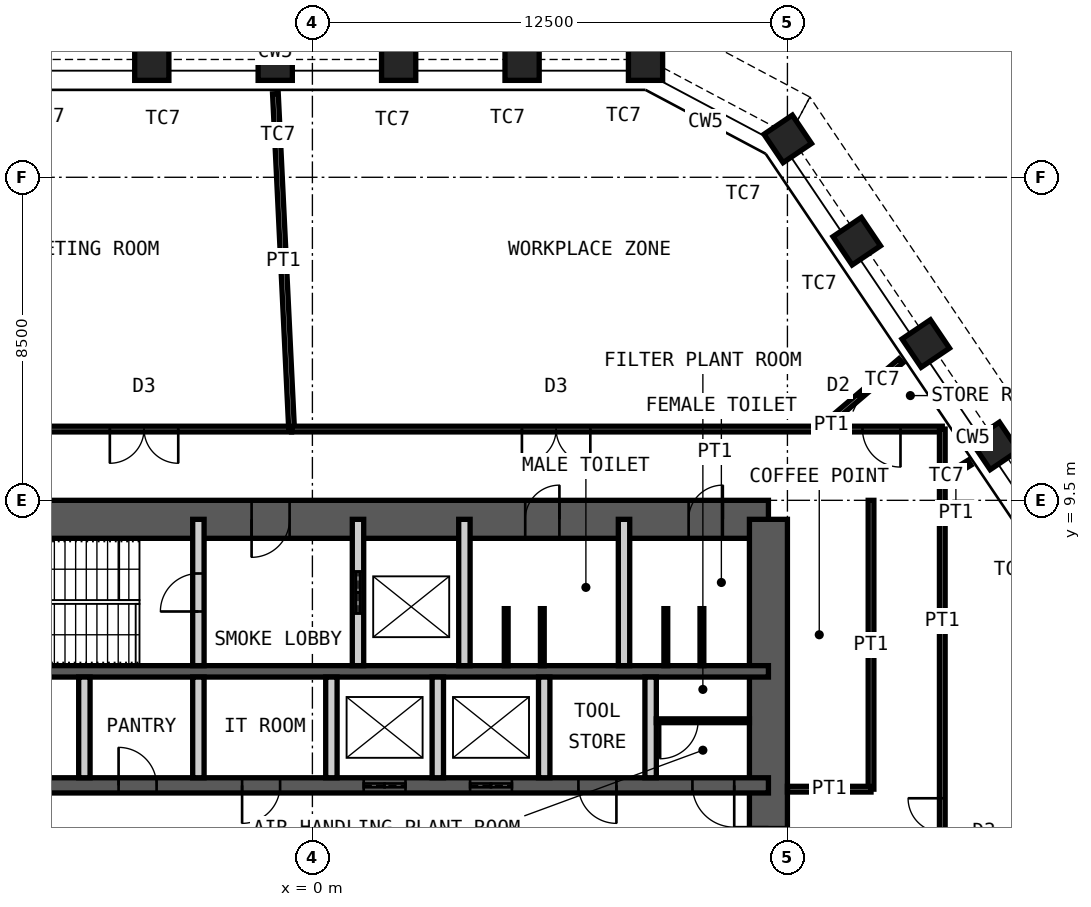
"""IFC4 building model, lengths in metres.
Left out: names, types, materials, properties, quantities, classifications, styles, units other than length and angle.
Written with IfcOpenShell. Run it as: python <this file> out.ifc"""

import sys

from ifc_helpers import new_model, si_unit, direction, frame, frame_2d, origin, origin_2d, place, context, subcontext, project, spatial, rectangle, hollow_rectangle, extrude, element, fill, save


model = new_model("IFC4")
c1 = context("Model", 3, precision=1e-05, world=origin(), true_north=direction((0.0, 1.0)))
c2 = subcontext(c1, "Body", "Model", "MODEL_VIEW")
j1 = project(units=[si_unit("LENGTHUNIT", "METRE"), si_unit("PLANEANGLEUNIT", "RADIAN")], contexts=[c1])
p1 = place(None, origin())
s1 = spatial("IfcSite", under=j1, at=p1, CompositionType="ELEMENT")
p2 = place(p1, origin())
s2 = spatial("IfcBuilding", under=s1, at=p2, CompositionType="ELEMENT")
p3 = place(p2, frame((0.0, 0.0, 299.8)))
s3 = spatial("IfcBuildingStorey", under=s2, at=p3, CompositionType="ELEMENT", Elevation=299.8)
for number, where, z_axis, x_axis in (
    (1, (-4.226, 21.0, 0.0), (0.0, 0.0, 1.0), (-1.0, 0.0, 0.0)),
    (2, (-0.978, 21.0, 0.0), (0.0, 0.0, 1.0), (-1.0, 0.0, 0.0)),
    (3, (2.27, 21.0, 0.0), (0.0, 0.0, 1.0), (-1.0, 0.0, 0.0)),
    (4, (5.518, 21.0, 0.0), (0.0, 0.0, 1.0), (-1.0, 0.0, 0.0)),
    (5, (8.766, 21.0, 0.0), (0.0, 0.0, 1.0), (-1.0, 0.0, 0.0)),
    (6, (12.508, 19.01, 0.0), (0.0, 0.0, 1.0), (-0.559, 0.829, 0.0)),
    (7, (14.324, 16.318, 0.0), (0.0, 0.0, 1.0), (-0.559, 0.829, 0.0)),
    (8, (16.141, 13.625, 0.0), (0.0, 0.0, 1.0), (-0.559, 0.829, 0.0)),
    (9, (17.957, 10.932, 0.0), (0.0, 0.0, 1.0), (-0.559, 0.829, 0.0)),
):
    element("IfcColumn", number, at=place(p3, frame(where, z_axis=z_axis, x_axis=x_axis)), inside=s3, PredefinedType="COLUMN", context=c2, shape_type="SweptSolid", body=[
        extrude(hollow_rectangle(XDim=0.9, YDim=0.9, WallThickness=0.06, at=origin_2d()), origin(), (0.0, 0.0, 1.0), 4.2),
    ])
p4 = place(p3, frame((-12.0, 9.0, 0.0), z_axis=(0.0, 0.0, 1.0), x_axis=(1.0, 0.0, 0.0)))
e10 = element("IfcWall", 10, at=p4, inside=s3, PredefinedType="SHEAR", context=c2, shape_type="SweptSolid", body=[
    extrude(rectangle(XDim=24.0, YDim=1.0, at=frame_2d((12.0, 0.0))), origin(), (0.0, 0.0, 1.0), 4.2),
])
p5 = place(p4, frame((10.4, 0.0, 0.0)))
e11 = element("IfcOpeningElement", 11, at=p5, cuts=e10, PredefinedType="OPENING", context=c2, shape_type="SweptSolid", body=[
    extrude(rectangle(XDim=1.0, YDim=2.1, at=frame_2d((0.5, 1.05))), frame((0.0, 0.51, 0.0), z_axis=(0.0, -1.0, 0.0), x_axis=(1.0, 0.0, 0.0)), (0.0, 0.0, 1.0), 1.02),
])
p6 = place(p4, frame((17.6, 0.0, 0.0)))
e12 = element("IfcOpeningElement", 12, at=p6, cuts=e10, PredefinedType="OPENING", context=c2, shape_type="SweptSolid", body=[
    extrude(rectangle(XDim=0.9, YDim=2.1, at=frame_2d((0.45, 1.05))), frame((0.0, 0.51, 0.0), z_axis=(0.0, -1.0, 0.0), x_axis=(1.0, 0.0, 0.0)), (0.0, 0.0, 1.0), 1.02),
])
p7 = place(p4, frame((21.9, 0.0, 0.0)))
e13 = element("IfcOpeningElement", 13, at=p7, cuts=e10, PredefinedType="OPENING", context=c2, shape_type="SweptSolid", body=[
    extrude(rectangle(XDim=0.9, YDim=2.1, at=frame_2d((0.45, 1.05))), frame((0.0, 0.51, 0.0), z_axis=(0.0, -1.0, 0.0), x_axis=(1.0, 0.0, 0.0)), (0.0, 0.0, 1.0), 1.02),
])
p8 = place(p3, frame((12.0, -9.0, 0.0), z_axis=(0.0, 0.0, 1.0), x_axis=(0.0, 1.0, 0.0)))
e14 = element("IfcWall", 14, at=p8, inside=s3, PredefinedType="SHEAR", context=c2, shape_type="SweptSolid", body=[
    extrude(rectangle(XDim=18.0, YDim=1.0, at=frame_2d((9.0, 0.0))), origin(), (0.0, 0.0, 1.0), 4.2),
])
p9 = place(p8, frame((8.1, 0.0, 0.0)))
e15 = element("IfcOpeningElement", 15, at=p9, cuts=e14, PredefinedType="OPENING", context=c2, shape_type="SweptSolid", body=[
    extrude(rectangle(XDim=1.8, YDim=2.1, at=frame_2d((0.9, 1.05))), frame((0.0, 0.51, 0.0), z_axis=(0.0, -1.0, 0.0), x_axis=(1.0, 0.0, 0.0)), (0.0, 0.0, 1.0), 1.02),
])
p10 = place(p3, frame((-12.0, 5.0, 0.0), z_axis=(0.0, 0.0, 1.0), x_axis=(1.0, 0.0, 0.0)))
e16 = element("IfcWall", 16, at=p10, inside=s3, PredefinedType="SHEAR", context=c2, shape_type="SweptSolid", body=[
    extrude(rectangle(XDim=24.0, YDim=0.3, at=frame_2d((12.0, 0.0))), origin(), (0.0, 0.0, 1.0), 4.2),
])
p11 = place(p3, frame((-12.0, 2.0, 0.0), z_axis=(0.0, 0.0, 1.0), x_axis=(1.0, 0.0, 0.0)))
e17 = element("IfcWall", 17, at=p11, inside=s3, PredefinedType="SHEAR", context=c2, shape_type="SweptSolid", body=[
    extrude(rectangle(XDim=24.0, YDim=0.4, at=frame_2d((12.0, 0.0))), origin(), (0.0, 0.0, 1.0), 4.2),
])
p12 = place(p11, frame((2.4, 0.0, 0.0)))
e18 = element("IfcOpeningElement", 18, at=p12, cuts=e17, PredefinedType="OPENING", context=c2, shape_type="SweptSolid", body=[
    extrude(rectangle(XDim=1.1, YDim=2.1, at=frame_2d((0.55, 1.05))), frame((0.0, 0.21, 0.0), z_axis=(0.0, -1.0, 0.0), x_axis=(1.0, 0.0, 0.0)), (0.0, 0.0, 1.0), 0.42),
])
p13 = place(p11, frame((22.0, 0.0, 0.0)))
e19 = element("IfcOpeningElement", 19, at=p13, cuts=e17, PredefinedType="OPENING", context=c2, shape_type="SweptSolid", body=[
    extrude(rectangle(XDim=1.1, YDim=2.1, at=frame_2d((0.55, 1.05))), frame((0.0, 0.21, 0.0), z_axis=(0.0, -1.0, 0.0), x_axis=(1.0, 0.0, 0.0)), (0.0, 0.0, 1.0), 0.42),
])
p14 = place(p11, frame((10.15, 0.0, 0.0)))
e20 = element("IfcOpeningElement", 20, at=p14, cuts=e17, PredefinedType="OPENING", context=c2, shape_type="SweptSolid", body=[
    extrude(rectangle(XDim=1.0, YDim=2.1, at=frame_2d((0.5, 1.05))), frame((0.0, 0.21, 0.0), z_axis=(0.0, -1.0, 0.0), x_axis=(1.0, 0.0, 0.0)), (0.0, 0.0, 1.0), 0.42),
])
p15 = place(p11, frame((6.9, 0.0, 0.0)))
e21 = element("IfcOpeningElement", 21, at=p15, cuts=e17, PredefinedType="OPENING", context=c2, shape_type="SweptSolid", body=[
    extrude(rectangle(XDim=1.0, YDim=2.1, at=frame_2d((0.5, 1.05))), frame((0.0, 0.21, 0.0), z_axis=(0.0, -1.0, 0.0), x_axis=(1.0, 0.0, 0.0)), (0.0, 0.0, 1.0), 0.42),
])
p16 = place(p11, frame((13.35, 0.0, 0.0)))
e22 = element("IfcOpeningElement", 22, at=p16, cuts=e17, PredefinedType="OPENING", context=c2, shape_type="SweptSolid", body=[
    extrude(rectangle(XDim=1.1, YDim=2.4, at=frame_2d((0.55, 1.2))), frame((0.0, 0.21, 0.0), z_axis=(0.0, -1.0, 0.0), x_axis=(1.0, 0.0, 0.0)), (0.0, 0.0, 1.0), 0.42),
])
p17 = place(p11, frame((16.15, 0.0, 0.0)))
e23 = element("IfcOpeningElement", 23, at=p17, cuts=e17, PredefinedType="OPENING", context=c2, shape_type="SweptSolid", body=[
    extrude(rectangle(XDim=1.1, YDim=2.4, at=frame_2d((0.55, 1.2))), frame((0.0, 0.21, 0.0), z_axis=(0.0, -1.0, 0.0), x_axis=(1.0, 0.0, 0.0)), (0.0, 0.0, 1.0), 0.42),
])
p18 = place(p11, frame((19.0, 0.0, 0.0)))
e24 = element("IfcOpeningElement", 24, at=p18, cuts=e17, PredefinedType="OPENING", context=c2, shape_type="SweptSolid", body=[
    extrude(rectangle(XDim=1.0, YDim=2.1, at=frame_2d((0.5, 1.05))), frame((0.0, 0.21, 0.0), z_axis=(0.0, -1.0, 0.0), x_axis=(1.0, 0.0, 0.0)), (0.0, 0.0, 1.0), 0.42),
])
p19 = place(p3, frame((-3.0, 5.15, 0.0), z_axis=(0.0, 0.0, 1.0), x_axis=(0.0, 1.0, 0.0)))
e25 = element("IfcWall", 25, at=p19, inside=s3, PredefinedType="PARTITIONING", context=c2, shape_type="SweptSolid", body=[
    extrude(rectangle(XDim=3.85, YDim=0.3, at=frame_2d((1.925, 0.0))), origin(), (0.0, 0.0, 1.0), 3.98),
])
p20 = place(p19, frame((1.425, 0.0, 0.0)))
e26 = element("IfcOpeningElement", 26, at=p20, cuts=e25, PredefinedType="OPENING", context=c2, shape_type="SweptSolid", body=[
    extrude(rectangle(XDim=1.0, YDim=2.1, at=frame_2d((0.5, 1.05))), frame((0.0, 0.16, 0.0), z_axis=(0.0, -1.0, 0.0), x_axis=(1.0, 0.0, 0.0)), (0.0, 0.0, 1.0), 0.32),
])
p21 = place(p3, frame((1.2, 5.15, 0.0), z_axis=(0.0, 0.0, 1.0), x_axis=(0.0, 1.0, 0.0)))
e27 = element("IfcWall", 27, at=p21, inside=s3, PredefinedType="PARTITIONING", context=c2, shape_type="SweptSolid", body=[
    extrude(rectangle(XDim=3.85, YDim=0.3, at=frame_2d((1.925, 0.0))), origin(), (0.0, 0.0, 1.0), 3.98),
])
p22 = place(p21, frame((1.375, 0.0, 0.0)))
e28 = element("IfcOpeningElement", 28, at=p22, cuts=e27, PredefinedType="OPENING", context=c2, shape_type="SweptSolid", body=[
    extrude(rectangle(XDim=1.1, YDim=2.4, at=frame_2d((0.55, 1.2))), frame((0.0, 0.16, 0.0), z_axis=(0.0, -1.0, 0.0), x_axis=(1.0, 0.0, 0.0)), (0.0, 0.0, 1.0), 0.32),
])
for number, where, z_axis, x_axis in (
    (29, (4.0, 5.15, 0.0), (0.0, 0.0, 1.0), (0.0, 1.0, 0.0)),
    (30, (8.2, 5.15, 0.0), (0.0, 0.0, 1.0), (0.0, 1.0, 0.0)),
):
    element("IfcWall", number, at=place(p3, frame(where, z_axis=z_axis, x_axis=x_axis)), inside=s3, PredefinedType="PARTITIONING", context=c2, shape_type="SweptSolid", body=[
        extrude(rectangle(XDim=3.85, YDim=0.3, at=frame_2d((1.925, 0.0))), origin(), (0.0, 0.0, 1.0), 3.98),
    ])
for number, where, z_axis, x_axis in (
    (31, (-6.0, 2.2, 0.0), (0.0, 0.0, 1.0), (0.0, 1.0, 0.0)),
    (32, (-3.0, 2.2, 0.0), (0.0, 0.0, 1.0), (0.0, 1.0, 0.0)),
    (33, (0.5, 2.2, 0.0), (0.0, 0.0, 1.0), (0.0, 1.0, 0.0)),
    (34, (3.3, 2.2, 0.0), (0.0, 0.0, 1.0), (0.0, 1.0, 0.0)),
    (35, (6.1, 2.2, 0.0), (0.0, 0.0, 1.0), (0.0, 1.0, 0.0)),
    (36, (8.9, 2.2, 0.0), (0.0, 0.0, 1.0), (0.0, 1.0, 0.0)),
):
    element("IfcWall", number, at=place(p3, frame(where, z_axis=z_axis, x_axis=x_axis)), inside=s3, PredefinedType="PARTITIONING", context=c2, shape_type="SweptSolid", body=[
        extrude(rectangle(XDim=2.65, YDim=0.3, at=frame_2d((1.325, 0.0))), origin(), (0.0, 0.0, 1.0), 3.98),
    ])
p23 = place(p3, frame((9.05, 3.7, 0.0), z_axis=(0.0, 0.0, 1.0), x_axis=(1.0, 0.0, 0.0)))
e37 = element("IfcWall", 37, at=p23, inside=s3, PredefinedType="PARTITIONING", context=c2, shape_type="SweptSolid", body=[
    extrude(rectangle(XDim=2.45, YDim=0.1, at=frame_2d((1.225, 0.0))), origin(), (0.0, 0.0, 1.0), 3.98),
])
p24 = place(p23, frame((0.1, 0.0, 0.0)))
e38 = element("IfcOpeningElement", 38, at=p24, cuts=e37, PredefinedType="OPENING", context=c2, shape_type="SweptSolid", body=[
    extrude(rectangle(XDim=1.0, YDim=2.4, at=frame_2d((0.5, 1.2))), frame((0.0, 0.06, 0.0), z_axis=(0.0, -1.0, 0.0), x_axis=(1.0, 0.0, 0.0)), (0.0, 0.0, 1.0), 0.12),
])
for number, where, z_axis, x_axis in (
    (39, (5.1, 5.15, 0.0), (0.0, 0.0, 1.0), (0.0, 1.0, 0.0)),
    (40, (6.05, 5.15, 0.0), (0.0, 0.0, 1.0), (0.0, 1.0, 0.0)),
    (41, (9.3, 5.15, 0.0), (0.0, 0.0, 1.0), (0.0, 1.0, 0.0)),
    (42, (10.25, 5.15, 0.0), (0.0, 0.0, 1.0), (0.0, 1.0, 0.0)),
):
    element("IfcWall", number, at=place(p3, frame(where, z_axis=z_axis, x_axis=x_axis)), inside=s3, PredefinedType="PARTITIONING", context=c2, shape_type="SweptSolid", body=[
        extrude(rectangle(XDim=1.5, YDim=0.1, at=frame_2d((0.75, 0.0))), origin(), (0.0, 0.0, 1.0), 2.1),
    ])
p25 = place(p3, frame((-8.312, 11.375, 0.0), z_axis=(0.0, 0.0, 1.0), x_axis=(1.0, 0.0, 0.0)))
e43 = element("IfcWall", 43, at=p25, inside=s3, PredefinedType="PARTITIONING", context=c2, shape_type="SweptSolid", body=[
    extrude(rectangle(XDim=7.764, YDim=0.15, at=frame_2d((3.882, 0.0))), origin(), (0.0, 0.0, 1.0), 4.03),
])
p26 = place(p25, frame((2.982, 0.0, 0.0)))
e44 = element("IfcOpeningElement", 44, at=p26, cuts=e43, PredefinedType="OPENING", context=c2, shape_type="SweptSolid", body=[
    extrude(rectangle(XDim=1.8, YDim=2.4, at=frame_2d((0.9, 1.2))), frame((0.0, 0.085, 0.0), z_axis=(0.0, -1.0, 0.0), x_axis=(1.0, 0.0, 0.0)), (0.0, 0.0, 1.0), 0.17),
])
p27 = place(p3, frame((-0.973, 20.2, 0.0), z_axis=(0.0, 0.0, 1.0), x_axis=(0.048134910622, -0.998840843368, 0.0)))
e45 = element("IfcWall", 45, at=p27, inside=s3, PredefinedType="PARTITIONING", context=c2, shape_type="SweptSolid", body=[
    extrude(rectangle(XDim=8.835, YDim=0.15, at=frame_2d((4.418, 0.0))), origin(), (0.0, 0.0, 1.0), 2.93),
])
p28 = place(p3, frame((-0.548, 11.375, 0.0), z_axis=(0.0, 0.0, 1.0), x_axis=(1.0, 0.0, 0.0)))
e46 = element("IfcWall", 46, at=p28, inside=s3, PredefinedType="PARTITIONING", context=c2, shape_type="SweptSolid", body=[
    extrude(rectangle(XDim=13.923, YDim=0.15, at=frame_2d((6.961, 0.0))), origin(), (0.0, 0.0, 1.0), 4.03),
])
p29 = place(p28, frame((6.062, 0.0, 0.0)))
e47 = element("IfcOpeningElement", 47, at=p29, cuts=e46, PredefinedType="OPENING", context=c2, shape_type="SweptSolid", body=[
    extrude(rectangle(XDim=1.8, YDim=2.4, at=frame_2d((0.9, 1.2))), frame((0.0, 0.085, 0.0), z_axis=(0.0, -1.0, 0.0), x_axis=(1.0, 0.0, 0.0)), (0.0, 0.0, 1.0), 0.17),
])
p30 = place(p3, frame((15.484, 13.169, 0.0), z_axis=(0.0, 0.0, 1.0), x_axis=(-0.761734753955, -0.647889006403, 0.0)))
e48 = element("IfcWall", 48, at=p30, inside=s3, PredefinedType="PARTITIONING", context=c2, shape_type="SweptSolid", body=[
    extrude(rectangle(XDim=2.769, YDim=0.15, at=frame_2d((1.384, 0.0))), origin(), (0.0, 0.0, 1.0), 2.93),
])
p31 = place(p3, frame((13.375, 11.375, 0.0), z_axis=(0.0, 0.0, 1.0), x_axis=(1.0, 0.0, 0.0)))
e49 = element("IfcWall", 49, at=p31, inside=s3, PredefinedType="PARTITIONING", context=c2, shape_type="SweptSolid", body=[
    extrude(rectangle(XDim=3.2, YDim=0.15, at=frame_2d((1.6, 0.0))), origin(), (0.0, 0.0, 1.0), 4.03),
])
p32 = place(p31, frame((1.1, 0.0, 0.0)))
e50 = element("IfcOpeningElement", 50, at=p32, cuts=e49, PredefinedType="OPENING", context=c2, shape_type="SweptSolid", body=[
    extrude(rectangle(XDim=1.0, YDim=2.4, at=frame_2d((0.5, 1.2))), frame((0.0, 0.085, 0.0), z_axis=(0.0, -1.0, 0.0), x_axis=(1.0, 0.0, 0.0)), (0.0, 0.0, 1.0), 0.17),
])
p33 = place(p3, frame((16.575, 11.375, 0.0), z_axis=(0.0, 0.0, 1.0), x_axis=(0.0, -1.0, 0.0)))
e51 = element("IfcWall", 51, at=p33, inside=s3, PredefinedType="PARTITIONING", context=c2, shape_type="SweptSolid", body=[
    extrude(rectangle(XDim=1.321, YDim=0.15, at=frame_2d((0.66, 0.0))), origin(), (0.0, 0.0, 1.0), 4.03),
])
p34 = place(p3, frame((17.291, 10.489, 0.0), z_axis=(0.0, 0.0, 1.0), x_axis=(-0.855013745288, -0.518605336811, 0.0)))
e52 = element("IfcWall", 52, at=p34, inside=s3, PredefinedType="PARTITIONING", context=c2, shape_type="SweptSolid", body=[
    extrude(rectangle(XDim=0.837, YDim=0.15, at=frame_2d((0.419, 0.0))), origin(), (0.0, 0.0, 1.0), 2.93),
])
p35 = place(p3, frame((16.575, 10.054, 0.0), z_axis=(0.0, 0.0, 1.0), x_axis=(0.0, -1.0, 0.0)))
e53 = element("IfcWall", 53, at=p35, inside=s3, PredefinedType="PARTITIONING", context=c2, shape_type="SweptSolid", body=[
    extrude(rectangle(XDim=18.588, YDim=0.15, at=frame_2d((9.294, 0.0))), origin(), (0.0, 0.0, 1.0), 4.03),
])
p36 = place(p35, frame((8.394, 0.0, 0.0)))
e54 = element("IfcOpeningElement", 54, at=p36, cuts=e53, PredefinedType="OPENING", context=c2, shape_type="SweptSolid", body=[
    extrude(rectangle(XDim=1.8, YDim=2.4, at=frame_2d((0.9, 1.2))), frame((0.0, 0.085, 0.0), z_axis=(0.0, -1.0, 0.0), x_axis=(1.0, 0.0, 0.0)), (0.0, 0.0, 1.0), 0.17),
])
p37 = place(p3, frame((14.7, 1.9, 0.0), z_axis=(0.0, 0.0, 1.0), x_axis=(0.0, 1.0, 0.0)))
e55 = element("IfcWall", 55, at=p37, inside=s3, PredefinedType="PARTITIONING", context=c2, shape_type="SweptSolid", body=[
    extrude(rectangle(XDim=7.6, YDim=0.15, at=frame_2d((3.8, 0.0))), origin(), (0.0, 0.0, 1.0), 4.03),
])
p38 = place(p3, frame((12.5, 1.9, 0.0), z_axis=(0.0, 0.0, 1.0), x_axis=(1.0, 0.0, 0.0)))
e56 = element("IfcWall", 56, at=p38, inside=s3, PredefinedType="PARTITIONING", context=c2, shape_type="SweptSolid", body=[
    extrude(rectangle(XDim=2.2, YDim=0.15, at=frame_2d((1.1, 0.0))), origin(), (0.0, 0.0, 1.0), 3.03),
])
p39 = place(p5, origin())
e57 = element("IfcDoor", 57, at=p39, inside=s3, OperationType="SINGLE_SWING_LEFT", PredefinedType="DOOR", context=c2, shape_type="SweptSolid", body=[
    extrude(rectangle(XDim=1.0, YDim=2.1, at=frame_2d((0.5, 1.05))), frame((0.0, 0.025, 0.0), z_axis=(0.0, -1.0, 0.0), x_axis=(1.0, 0.0, 0.0)), (0.0, 0.0, 1.0), 0.05),
])
fill(e11, e57)
p40 = place(p6, origin())
e58 = element("IfcDoor", 58, at=p40, inside=s3, OperationType="SINGLE_SWING_LEFT", PredefinedType="DOOR", context=c2, shape_type="SweptSolid", body=[
    extrude(rectangle(XDim=0.9, YDim=2.1, at=frame_2d((0.45, 1.05))), frame((0.0, 0.025, 0.0), z_axis=(0.0, -1.0, 0.0), x_axis=(1.0, 0.0, 0.0)), (0.0, 0.0, 1.0), 0.05),
])
fill(e12, e58)
p41 = place(p7, origin())
e59 = element("IfcDoor", 59, at=p41, inside=s3, OperationType="SINGLE_SWING_LEFT", PredefinedType="DOOR", context=c2, shape_type="SweptSolid", body=[
    extrude(rectangle(XDim=0.9, YDim=2.1, at=frame_2d((0.45, 1.05))), frame((0.0, 0.025, 0.0), z_axis=(0.0, -1.0, 0.0), x_axis=(1.0, 0.0, 0.0)), (0.0, 0.0, 1.0), 0.05),
])
fill(e13, e59)
p42 = place(p20, origin())
e60 = element("IfcDoor", 60, at=p42, inside=s3, OperationType="SINGLE_SWING_RIGHT", PredefinedType="DOOR", context=c2, shape_type="SweptSolid", body=[
    extrude(rectangle(XDim=1.0, YDim=2.1, at=frame_2d((0.5, 1.05))), frame((0.0, 0.025, 0.0), z_axis=(0.0, -1.0, 0.0), x_axis=(1.0, 0.0, 0.0)), (0.0, 0.0, 1.0), 0.05),
])
fill(e26, e60)
p43 = place(p13, origin())
e61 = element("IfcDoor", 61, at=p43, inside=s3, OperationType="SINGLE_SWING_RIGHT", PredefinedType="DOOR", context=c2, shape_type="SweptSolid", body=[
    extrude(rectangle(XDim=1.1, YDim=2.1, at=frame_2d((0.55, 1.05))), frame((0.0, 0.025, 0.0), z_axis=(0.0, -1.0, 0.0), x_axis=(1.0, 0.0, 0.0)), (0.0, 0.0, 1.0), 0.05),
])
fill(e19, e61)
p44 = place(p14, origin())
e62 = element("IfcDoor", 62, at=p44, inside=s3, OperationType="SINGLE_SWING_LEFT", PredefinedType="DOOR", context=c2, shape_type="SweptSolid", body=[
    extrude(rectangle(XDim=1.0, YDim=2.1, at=frame_2d((0.5, 1.05))), frame((0.0, 0.025, 0.0), z_axis=(0.0, -1.0, 0.0), x_axis=(1.0, 0.0, 0.0)), (0.0, 0.0, 1.0), 0.05),
])
fill(e20, e62)
p45 = place(p9, origin())
e63 = element("IfcDoor", 63, at=p45, inside=s3, OperationType="DOUBLE_DOOR_DOUBLE_SWING", PredefinedType="DOOR", context=c2, shape_type="SweptSolid", body=[
    extrude(rectangle(XDim=1.8, YDim=2.1, at=frame_2d((0.9, 1.05))), frame((0.0, 0.025, 0.0), z_axis=(0.0, -1.0, 0.0), x_axis=(1.0, 0.0, 0.0)), (0.0, 0.0, 1.0), 0.05),
])
fill(e15, e63)
p46 = place(p22, origin())
e64 = element("IfcDoor", 64, at=p46, inside=s3, OperationType="DOUBLE_DOOR_SLIDING", PredefinedType="DOOR", context=c2, shape_type="SweptSolid", body=[
    extrude(rectangle(XDim=1.1, YDim=2.4, at=frame_2d((0.55, 1.2))), frame((0.0, 0.025, 0.0), z_axis=(0.0, -1.0, 0.0), x_axis=(1.0, 0.0, 0.0)), (0.0, 0.0, 1.0), 0.05),
])
fill(e28, e64)
p47 = place(p15, origin())
e65 = element("IfcDoor", 65, at=p47, inside=s3, OperationType="SINGLE_SWING_RIGHT", PredefinedType="DOOR", context=c2, shape_type="SweptSolid", body=[
    extrude(rectangle(XDim=1.0, YDim=2.1, at=frame_2d((0.5, 1.05))), frame((0.0, 0.025, 0.0), z_axis=(0.0, -1.0, 0.0), x_axis=(1.0, 0.0, 0.0)), (0.0, 0.0, 1.0), 0.05),
])
fill(e21, e65)
p48 = place(p16, origin())
e66 = element("IfcDoor", 66, at=p48, inside=s3, OperationType="DOUBLE_DOOR_SLIDING", PredefinedType="DOOR", context=c2, shape_type="SweptSolid", body=[
    extrude(rectangle(XDim=1.1, YDim=2.4, at=frame_2d((0.55, 1.2))), frame((0.0, 0.025, 0.0), z_axis=(0.0, -1.0, 0.0), x_axis=(1.0, 0.0, 0.0)), (0.0, 0.0, 1.0), 0.05),
])
fill(e22, e66)
p49 = place(p17, origin())
e67 = element("IfcDoor", 67, at=p49, inside=s3, OperationType="DOUBLE_DOOR_SLIDING", PredefinedType="DOOR", context=c2, shape_type="SweptSolid", body=[
    extrude(rectangle(XDim=1.1, YDim=2.4, at=frame_2d((0.55, 1.2))), frame((0.0, 0.025, 0.0), z_axis=(0.0, -1.0, 0.0), x_axis=(1.0, 0.0, 0.0)), (0.0, 0.0, 1.0), 0.05),
])
fill(e23, e67)
p50 = place(p18, origin())
e68 = element("IfcDoor", 68, at=p50, inside=s3, OperationType="SINGLE_SWING_RIGHT", PredefinedType="DOOR", context=c2, shape_type="SweptSolid", body=[
    extrude(rectangle(XDim=1.0, YDim=2.1, at=frame_2d((0.5, 1.05))), frame((0.0, 0.025, 0.0), z_axis=(0.0, -1.0, 0.0), x_axis=(1.0, 0.0, 0.0)), (0.0, 0.0, 1.0), 0.05),
])
fill(e24, e68)
p51 = place(p24, origin())
e69 = element("IfcDoor", 69, at=p51, inside=s3, OperationType="SINGLE_SWING_LEFT", PredefinedType="DOOR", context=c2, shape_type="SweptSolid", body=[
    extrude(rectangle(XDim=1.0, YDim=2.4, at=frame_2d((0.5, 1.2))), frame((0.0, 0.025, 0.0), z_axis=(0.0, -1.0, 0.0), x_axis=(1.0, 0.0, 0.0)), (0.0, 0.0, 1.0), 0.05),
])
fill(e38, e69)
p52 = place(p26, origin())
e70 = element("IfcDoor", 70, at=p52, inside=s3, OperationType="DOUBLE_DOOR_DOUBLE_SWING", PredefinedType="DOOR", context=c2, shape_type="SweptSolid", body=[
    extrude(rectangle(XDim=1.8, YDim=2.4, at=frame_2d((0.9, 1.2))), frame((0.0, 0.025, 0.0), z_axis=(0.0, -1.0, 0.0), x_axis=(1.0, 0.0, 0.0)), (0.0, 0.0, 1.0), 0.05),
])
fill(e44, e70)
p53 = place(p29, origin())
e71 = element("IfcDoor", 71, at=p53, inside=s3, OperationType="DOUBLE_DOOR_DOUBLE_SWING", PredefinedType="DOOR", context=c2, shape_type="SweptSolid", body=[
    extrude(rectangle(XDim=1.8, YDim=2.4, at=frame_2d((0.9, 1.2))), frame((0.0, 0.025, 0.0), z_axis=(0.0, -1.0, 0.0), x_axis=(1.0, 0.0, 0.0)), (0.0, 0.0, 1.0), 0.05),
])
fill(e47, e71)
p54 = place(p32, origin())
e72 = element("IfcDoor", 72, at=p54, inside=s3, OperationType="SINGLE_SWING_RIGHT", PredefinedType="DOOR", context=c2, shape_type="SweptSolid", body=[
    extrude(rectangle(XDim=1.0, YDim=2.4, at=frame_2d((0.5, 1.2))), frame((0.0, 0.025, 0.0), z_axis=(0.0, -1.0, 0.0), x_axis=(1.0, 0.0, 0.0)), (0.0, 0.0, 1.0), 0.05),
])
fill(e50, e72)
p55 = place(p36, origin())
e73 = element("IfcDoor", 73, at=p55, inside=s3, OperationType="DOUBLE_DOOR_DOUBLE_SWING", PredefinedType="DOOR", context=c2, shape_type="SweptSolid", body=[
    extrude(rectangle(XDim=1.8, YDim=2.4, at=frame_2d((0.9, 1.2))), frame((0.0, 0.025, 0.0), z_axis=(0.0, -1.0, 0.0), x_axis=(1.0, 0.0, 0.0)), (0.0, 0.0, 1.0), 0.05),
])
fill(e54, e73)
save(model, sys.argv[1])
